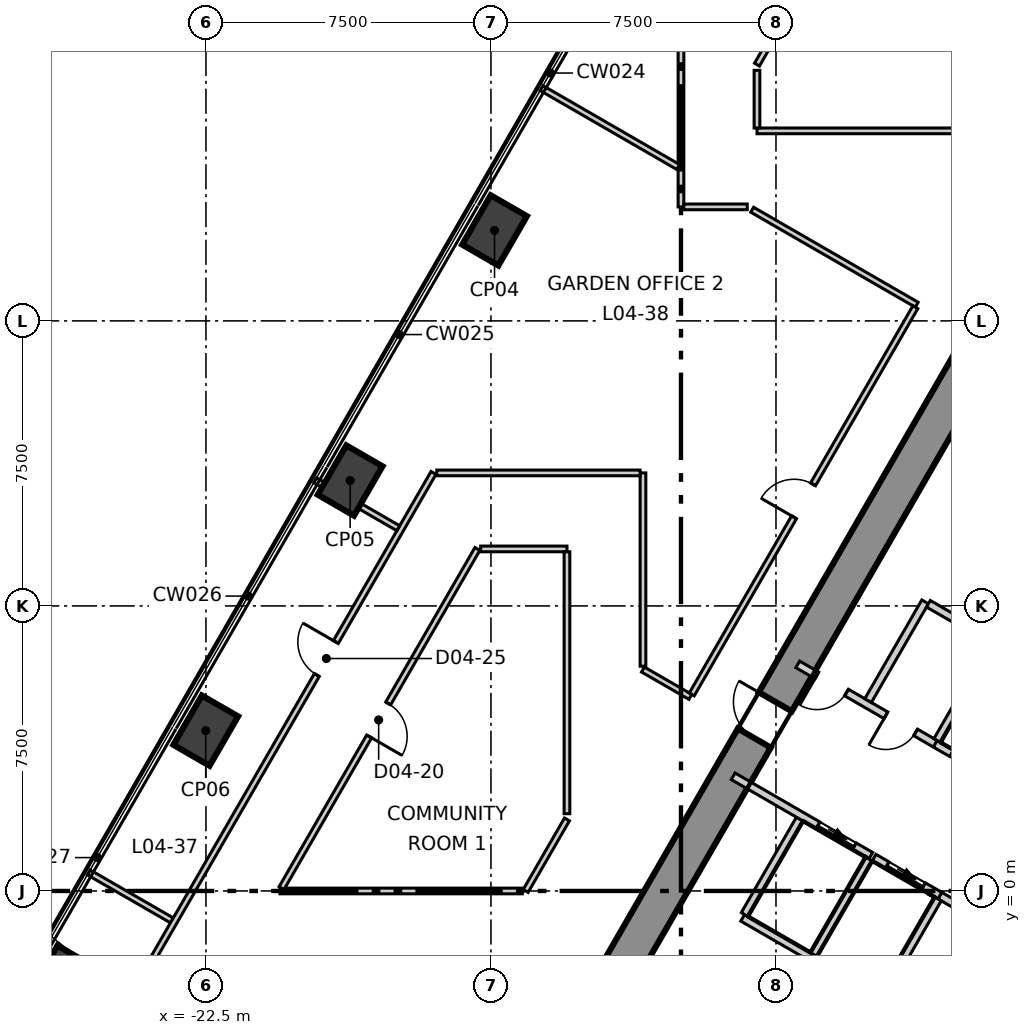
"""IFC4 building model, lengths in metres.
Left out: names, types, materials, properties, quantities, classifications, styles, units other than length and angle.
Written with IfcOpenShell. Run it as: python <this file> out.ifc"""

import sys

from ifc_helpers import new_model, si_unit, direction, frame, frame_2d, origin, origin_2d, place, context, subcontext, project, spatial, polyline, rectangle, outline, extrude, element, fill, save


model = new_model("IFC4")
c1 = context("Model", 3, precision=1e-05, world=origin(), true_north=direction((0.0, 1.0)))
c2 = subcontext(c1, "Body", "Model", "MODEL_VIEW")
j1 = project(units=[si_unit("LENGTHUNIT", "METRE"), si_unit("PLANEANGLEUNIT", "RADIAN")], contexts=[c1])
p1 = place(None, origin())
s1 = spatial("IfcSite", under=j1, at=p1, CompositionType="ELEMENT")
p2 = place(p1, origin())
s2 = spatial("IfcBuilding", under=s1, at=p2, CompositionType="ELEMENT")
p3 = place(p2, frame((0.0, 0.0, 25.3)))
s3 = spatial("IfcBuildingStorey", under=s2, at=p3, CompositionType="ELEMENT", Elevation=25.3)
p4 = place(p3, frame((-1.617, 15.2, -0.4), z_axis=(0.0, 0.0, 1.0), x_axis=(-0.499992141631, -0.866029940768, 0.0)))
e1 = element("IfcWall", 1, at=p4, inside=s3, PredefinedType="SHEAR", context=c2, shape_type="SweptSolid", body=[
    extrude(outline(polyline([(-0.289, -0.499), (1.656, -0.499), (3.601, -0.499), (5.547, -0.499), (7.492, -0.499), (9.437, -0.5), (11.382, -0.5), (13.328, -0.5), (15.273, -0.5), (17.218, -0.5), (19.163, -0.5), (21.109, -0.5), (23.054, -0.5), (24.999, -0.5), (24.422, 0.5), (22.566, 0.5), (20.709, 0.5), (18.853, 0.5), (16.997, 0.5), (15.14, 0.5), (13.284, 0.5), (11.427, 0.5), (9.571, 0.5), (7.715, 0.5), (5.858, 0.5), (4.002, 0.5), (2.146, 0.5), (0.289, 0.5), (-0.289, -0.499)])), origin(), (0.0, 0.0, 1.0), 5.0),
])
p5 = place(p4, frame((11.805, 0.0, 0.4)))
e2 = element("IfcOpeningElement", 2, at=p5, cuts=e1, PredefinedType="OPENING", context=c2, shape_type="SweptSolid", body=[
    extrude(rectangle(XDim=1.1, YDim=2.1, at=frame_2d((0.55, 1.05))), frame((0.0, 0.51, 0.0), z_axis=(0.0, -1.0, 0.0), x_axis=(1.0, 0.0, 0.0)), (0.0, 0.0, 1.0), 1.02),
])
for number, where, z_axis, x_axis in (
    (3, (-14.906, 17.381, -0.4), (0.0, 0.0, 1.0), (0.5, 0.866, 0.0)),
    (4, (-18.706, 10.8, -0.4), (0.0, 0.0, 1.0), (0.5, 0.866, 0.0)),
    (5, (-22.506, 4.219, -0.4), (0.0, 0.0, 1.0), (0.5, 0.866, 0.0)),
    (6, (-26.306, -2.362, -0.4), (0.0, 0.0, 1.0), (0.5, 0.866, 0.0)),
):
    element("IfcColumn", number, at=place(p3, frame(where, z_axis=z_axis, x_axis=x_axis)), inside=s3, PredefinedType="COLUMN", context=c2, shape_type="SweptSolid", body=[
        extrude(rectangle(XDim=1.5, YDim=1.1, at=origin_2d()), origin(), (0.0, 0.0, 1.0), 5.0),
    ])
p6 = place(p3, frame((-25.583, 0.488, 0.0), z_axis=(0.0, 0.0, 1.0), x_axis=(0.866050293573, -0.499956887143, 0.0)))
e7 = element("IfcWall", 7, at=p6, inside=s3, PredefinedType="PARTITIONING", context=c2, shape_type="SweptSolid", body=[
    extrude(rectangle(XDim=2.524, YDim=0.15, at=frame_2d((1.262, 0.0))), origin(), (0.0, 0.0, 1.0), 4.6),
])
p7 = place(p3, frame((-24.249, -2.4, 0.0), z_axis=(0.0, 0.0, 1.0), x_axis=(0.500030212684, 0.86600795978, 0.0)))
e8 = element("IfcWall", 8, at=p7, inside=s3, PredefinedType="PARTITIONING", context=c2, shape_type="SweptSolid", body=[
    extrude(rectangle(XDim=15.473, YDim=0.15, at=frame_2d((7.737, 0.0))), origin(), (0.0, 0.0, 1.0), 4.6),
])
p8 = place(p7, frame((9.334, 0.0, 0.0)))
e9 = element("IfcOpeningElement", 9, at=p8, cuts=e8, PredefinedType="OPENING", context=c2, shape_type="SweptSolid", body=[
    extrude(rectangle(XDim=1.0, YDim=2.1, at=frame_2d((0.5, 1.05))), frame((0.0, 0.085, 0.0), z_axis=(0.0, -1.0, 0.0), x_axis=(1.0, 0.0, 0.0)), (0.0, 0.0, 1.0), 0.17),
])
p9 = place(p3, frame((-19.626, 10.807, 0.0), z_axis=(0.0, 0.0, 1.0), x_axis=(0.865979509711, -0.500079482444, 0.0)))
e10 = element("IfcWall", 10, at=p9, inside=s3, PredefinedType="PARTITIONING", context=c2, shape_type="SweptSolid", body=[
    extrude(rectangle(XDim=2.525, YDim=0.15, at=frame_2d((1.263, 0.0))), origin(), (0.0, 0.0, 1.0), 4.1),
])
p10 = place(p3, frame((-11.0, 5.826, 0.0), z_axis=(0.0, 0.0, 1.0), x_axis=(0.866326729571, -0.49947772486, 0.0)))
e11 = element("IfcWall", 11, at=p10, inside=s3, PredefinedType="PARTITIONING", context=c2, shape_type="SweptSolid", body=[
    extrude(rectangle(XDim=1.439, YDim=0.15, at=frame_2d((0.72, 0.0))), origin(), (0.0, 0.0, 1.0), 4.1),
])
p11 = place(p3, frame((-10.0, 18.0, 0.0), z_axis=(0.0, 0.0, 1.0), x_axis=(0.0, 1.0, 0.0)))
e12 = element("IfcWall", 12, at=p11, inside=s3, PredefinedType="PARTITIONING", context=c2, shape_type="SweptSolid", body=[
    extrude(rectangle(XDim=4.129, YDim=0.15, at=frame_2d((2.064, 0.0))), origin(), (0.0, 0.0, 1.0), 4.6),
])
p12 = place(p3, frame((-9.925, 18.0, 0.0), z_axis=(0.0, 0.0, 1.0), x_axis=(1.0, 0.0, 0.0)))
e13 = element("IfcWall", 13, at=p12, inside=s3, PredefinedType="PARTITIONING", context=c2, shape_type="SweptSolid", body=[
    extrude(rectangle(XDim=1.669, YDim=0.15, at=frame_2d((0.834, 0.0))), origin(), (0.0, 0.0, 1.0), 4.6),
])
p13 = place(p3, frame((-13.668, 21.125, 0.0), z_axis=(0.0, 0.0, 1.0), x_axis=(0.865970972971, -0.500094265086, 0.0)))
e14 = element("IfcWall", 14, at=p13, inside=s3, PredefinedType="PARTITIONING", context=c2, shape_type="SweptSolid", body=[
    extrude(rectangle(XDim=4.149, YDim=0.15, at=frame_2d((2.075, 0.0))), origin(), (0.0, 0.0, 1.0), 4.6),
])
p14 = place(p3, frame((-8.126, 17.925, 0.0), z_axis=(0.0, 0.0, 1.0), x_axis=(0.866022959057, -0.500004234368, 0.0)))
e15 = element("IfcWall", 15, at=p14, inside=s3, PredefinedType="PARTITIONING", context=c2, shape_type="SweptSolid", body=[
    extrude(rectangle(XDim=5.0, YDim=0.15, at=frame_2d((2.5, 0.0))), origin(), (0.0, 0.0, 1.0), 4.6),
])
p15 = place(p3, frame((-9.716, 5.172, 0.0), z_axis=(0.0, 0.0, 1.0), x_axis=(0.500064951837, 0.865987900576, 0.0)))
e16 = element("IfcWall", 16, at=p15, inside=s3, PredefinedType="PARTITIONING", context=c2, shape_type="SweptSolid", body=[
    extrude(rectangle(XDim=11.765, YDim=0.15, at=frame_2d((5.882, 0.0))), origin(), (0.0, 0.0, 1.0), 4.6),
])
p16 = place(p15, frame((5.382, 0.0, 0.0)))
e17 = element("IfcOpeningElement", 17, at=p16, cuts=e16, PredefinedType="OPENING", context=c2, shape_type="SweptSolid", body=[
    extrude(rectangle(XDim=1.0, YDim=2.1, at=frame_2d((0.5, 1.05))), frame((0.0, 0.085, 0.0), z_axis=(0.0, -1.0, 0.0), x_axis=(1.0, 0.0, 0.0)), (0.0, 0.0, 1.0), 0.17),
])
p17 = place(p3, frame((-11.0, 5.913, 0.0), z_axis=(0.0, 0.0, 1.0), x_axis=(0.0, 1.0, 0.0)))
e18 = element("IfcWall", 18, at=p17, inside=s3, PredefinedType="PARTITIONING", context=c2, shape_type="SweptSolid", body=[
    extrude(rectangle(XDim=5.087, YDim=0.15, at=frame_2d((2.543, 0.0))), origin(), (0.0, 0.0, 1.0), 4.6),
])
p18 = place(p3, frame((-16.426, 11.0, 0.0), z_axis=(0.0, 0.0, 1.0), x_axis=(1.0, 0.0, 0.0)))
e19 = element("IfcWall", 19, at=p18, inside=s3, PredefinedType="PARTITIONING", context=c2, shape_type="SweptSolid", body=[
    extrude(rectangle(XDim=5.351, YDim=0.15, at=frame_2d((2.676, 0.0))), origin(), (0.0, 0.0, 1.0), 4.6),
])
p19 = place(p3, frame((-14.087, 0.0, 0.0), z_axis=(0.0, 0.0, 1.0), x_axis=(0.499907138174, 0.866079010947, 0.0)))
e20 = element("IfcWall", 20, at=p19, inside=s3, PredefinedType="PARTITIONING", context=c2, shape_type="SweptSolid", body=[
    extrude(rectangle(XDim=2.174, YDim=0.15, at=frame_2d((1.087, 0.0))), origin(), (0.0, 0.0, 1.0), 4.6),
])
p20 = place(p3, frame((-20.554, 0.0, 0.0), z_axis=(0.0, 0.0, 1.0), x_axis=(1.0, 0.0, 0.0)))
e21 = element("IfcWall", 21, at=p20, inside=s3, PredefinedType="PARTITIONING", context=c2, shape_type="SweptSolid", body=[
    extrude(rectangle(XDim=6.38, YDim=0.15, at=frame_2d((3.19, 0.0))), origin(), (0.0, 0.0, 1.0), 4.6),
])
p21 = place(p3, frame((-20.51, 0.075, 0.0), z_axis=(0.0, 0.0, 1.0), x_axis=(0.500014323953, 0.866017133688, 0.0)))
e22 = element("IfcWall", 22, at=p21, inside=s3, PredefinedType="PARTITIONING", context=c2, shape_type="SweptSolid", body=[
    extrude(rectangle(XDim=10.306, YDim=0.15, at=frame_2d((5.153, 0.0))), origin(), (0.0, 0.0, 1.0), 4.6),
])
p22 = place(p21, frame((4.609, 0.0, 0.0)))
e23 = element("IfcOpeningElement", 23, at=p22, cuts=e22, PredefinedType="OPENING", context=c2, shape_type="SweptSolid", body=[
    extrude(rectangle(XDim=1.0, YDim=2.1, at=frame_2d((0.5, 1.05))), frame((0.0, 0.085, 0.0), z_axis=(0.0, -1.0, 0.0), x_axis=(1.0, 0.0, 0.0)), (0.0, 0.0, 1.0), 0.17),
])
p23 = place(p3, frame((-8.0, 21.743, 0.0), z_axis=(0.0, 0.0, 1.0), x_axis=(0.499999188372, 0.866025872377, 0.0)))
e24 = element("IfcWall", 24, at=p23, inside=s3, PredefinedType="PARTITIONING", context=c2, shape_type="SweptSolid", body=[
    extrude(rectangle(XDim=8.986, YDim=0.15, at=frame_2d((4.493, 0.0))), origin(), (0.0, 0.0, 1.0), 4.6),
])
p24 = place(p3, frame((-15.271, 9.0, 0.0), z_axis=(0.0, 0.0, 1.0), x_axis=(1.0, 0.0, 0.0)))
e25 = element("IfcWall", 25, at=p24, inside=s3, PredefinedType="PARTITIONING", context=c2, shape_type="SweptSolid", body=[
    extrude(rectangle(XDim=2.271, YDim=0.15, at=frame_2d((1.135, 0.0))), origin(), (0.0, 0.0, 1.0), 4.6),
])
p25 = place(p3, frame((-13.0, 2.033, 0.0), z_axis=(0.0, 0.0, 1.0), x_axis=(0.0, 1.0, 0.0)))
e26 = element("IfcWall", 26, at=p25, inside=s3, PredefinedType="PARTITIONING", context=c2, shape_type="SweptSolid", body=[
    extrude(rectangle(XDim=6.892, YDim=0.15, at=frame_2d((3.446, 0.0))), origin(), (0.0, 0.0, 1.0), 4.6),
])
p26 = place(p3, frame((-8.0, 20.0, 0.0), z_axis=(0.0, 0.0, 1.0), x_axis=(1.0, 0.0, 0.0)))
e27 = element("IfcWall", 27, at=p26, inside=s3, PredefinedType="PARTITIONING", context=c2, shape_type="SweptSolid", body=[
    extrude(rectangle(XDim=15.925, YDim=0.15, at=frame_2d((7.962, 0.0))), origin(), (0.0, 0.0, 1.0), 4.6),
])
p27 = place(p26, frame((6.8, 0.0, 0.0)))
e28 = element("IfcOpeningElement", 28, at=p27, cuts=e27, PredefinedType="OPENING", context=c2, shape_type="SweptSolid", body=[
    extrude(rectangle(XDim=2.4, YDim=2.1, at=frame_2d((1.2, 1.05))), frame((0.0, 0.085, 0.0), z_axis=(0.0, -1.0, 0.0), x_axis=(1.0, 0.0, 0.0)), (0.0, 0.0, 1.0), 0.17),
])
p28 = place(p3, frame((-8.0, 20.075, 0.0), z_axis=(0.0, 0.0, 1.0), x_axis=(0.0, 1.0, 0.0)))
e29 = element("IfcWall", 29, at=p28, inside=s3, PredefinedType="PARTITIONING", context=c2, shape_type="SweptSolid", body=[
    extrude(rectangle(XDim=1.518, YDim=0.15, at=frame_2d((0.759, 0.0))), origin(), (0.0, 0.0, 1.0), 4.6),
])
p29 = place(p3, frame((-8.376, -0.707, 0.0), z_axis=(0.0, 0.0, 1.0), x_axis=(0.866067520717, -0.499927044236, 0.0)))
e30 = element("IfcWall", 30, at=p29, inside=s3, PredefinedType="SOLIDWALL", context=c2, shape_type="SweptSolid", body=[
    extrude(rectangle(XDim=2.1, YDim=0.2, at=frame_2d((1.05, 0.0))), origin(), (0.0, 0.0, 1.0), 4.6),
])
p30 = place(p3, frame((-8.326, -0.62, 0.0), z_axis=(0.0, 0.0, 1.0), x_axis=(0.500023687443, 0.866011727401, 0.0)))
e31 = element("IfcWall", 31, at=p30, inside=s3, PredefinedType="SOLIDWALL", context=c2, shape_type="SweptSolid", body=[
    extrude(rectangle(XDim=2.9, YDim=0.2, at=frame_2d((1.45, 0.0))), origin(), (0.0, 0.0, 1.0), 4.6),
])
p31 = place(p3, frame((-8.627, 3.018, 0.0), z_axis=(0.0, 0.0, 1.0), x_axis=(0.866039775641, -0.499975106388, 0.0)))
e32 = element("IfcWall", 32, at=p31, inside=s3, PredefinedType="SOLIDWALL", context=c2, shape_type="SweptSolid", body=[
    extrude(rectangle(XDim=4.182, YDim=0.2, at=frame_2d((2.091, 0.0))), origin(), (0.0, 0.0, 1.0), 4.6),
])
p32 = place(p31, frame((2.58, 0.0, 0.0)))
e33 = element("IfcOpeningElement", 33, at=p32, cuts=e32, PredefinedType="OPENING", context=c2, shape_type="SweptSolid", body=[
    extrude(rectangle(XDim=1.1, YDim=2.1, at=frame_2d((0.55, 1.05))), frame((0.0, 0.11, 0.0), z_axis=(0.0, -1.0, 0.0), x_axis=(1.0, 0.0, 0.0)), (0.0, 0.0, 1.0), 0.22),
])
p33 = place(p3, frame((-3.188, -0.122, 0.0), z_axis=(0.0, 0.0, 1.0), x_axis=(0.865705793592, -0.50055317294, 0.0)))
e34 = element("IfcWall", 34, at=p33, inside=s3, PredefinedType="SOLIDWALL", context=c2, shape_type="SweptSolid", body=[
    extrude(rectangle(XDim=0.797, YDim=0.2, at=frame_2d((0.398, 0.0))), origin(), (0.0, 0.0, 1.0), 4.6),
])
p34 = place(p3, frame((-6.927, 5.962, 0.0), z_axis=(0.0, 0.0, 1.0), x_axis=(0.866065051207, -0.49993132236, 0.0)))
e35 = element("IfcWall", 35, at=p34, inside=s3, PredefinedType="SOLIDWALL", context=c2, shape_type="SweptSolid", body=[
    extrude(rectangle(XDim=4.182, YDim=0.2, at=frame_2d((2.091, 0.0))), origin(), (0.0, 0.0, 1.0), 4.6),
])
p35 = place(p34, frame((2.68, 0.0, 0.0)))
e36 = element("IfcOpeningElement", 36, at=p35, cuts=e35, PredefinedType="OPENING", context=c2, shape_type="SweptSolid", body=[
    extrude(rectangle(XDim=0.9, YDim=2.1, at=frame_2d((0.45, 1.05))), frame((0.0, 0.11, 0.0), z_axis=(0.0, -1.0, 0.0), x_axis=(1.0, 0.0, 0.0)), (0.0, 0.0, 1.0), 0.22),
])
p36 = place(p34, frame((0.58, 0.0, 0.0)))
e37 = element("IfcOpeningElement", 37, at=p36, cuts=e35, PredefinedType="OPENING", context=c2, shape_type="SweptSolid", body=[
    extrude(rectangle(XDim=0.9, YDim=2.1, at=frame_2d((0.45, 1.05))), frame((0.0, 0.11, 0.0), z_axis=(0.0, -1.0, 0.0), x_axis=(1.0, 0.0, 0.0)), (0.0, 0.0, 1.0), 0.22),
])
p37 = place(p3, frame((-5.076, 5.009, 0.0), z_axis=(0.0, 0.0, 1.0), x_axis=(0.50002537861, 0.866010750942, 0.0)))
e38 = element("IfcWall", 38, at=p37, inside=s3, PredefinedType="SOLIDWALL", context=c2, shape_type="SweptSolid", body=[
    extrude(rectangle(XDim=3.0, YDim=0.2, at=frame_2d((1.5, 0.0))), origin(), (0.0, 0.0, 1.0), 4.6),
])
p38 = place(p3, frame((-3.489, 7.557, 0.0), z_axis=(0.0, 0.0, 1.0), x_axis=(0.866010750942, -0.50002537861, 0.0)))
e39 = element("IfcWall", 39, at=p38, inside=s3, PredefinedType="SOLIDWALL", context=c2, shape_type="SweptSolid", body=[
    extrude(rectangle(XDim=2.0, YDim=0.2, at=frame_2d((1.0, 0.0))), origin(), (0.0, 0.0, 1.0), 4.6),
])
p39 = place(p3, frame((-6.557, -1.757, 0.0), z_axis=(0.0, 0.0, 1.0), x_axis=(0.8659754619, -0.500086491905, 0.0)))
e40 = element("IfcWall", 40, at=p39, inside=s3, PredefinedType="SOLIDWALL", context=c2, shape_type="SweptSolid", body=[
    extrude(rectangle(XDim=1.916, YDim=0.2, at=frame_2d((0.958, 0.0))), origin(), (0.0, 0.0, 1.0), 4.6),
])
p40 = place(p3, frame((-6.507, -1.67, 0.0), z_axis=(0.0, 0.0, 1.0), x_axis=(0.50012328804, 0.865954211699, 0.0)))
e41 = element("IfcWall", 41, at=p40, inside=s3, PredefinedType="SOLIDWALL", context=c2, shape_type="SweptSolid", body=[
    extrude(rectangle(XDim=2.9, YDim=0.2, at=frame_2d((1.45, 0.0))), origin(), (0.0, 0.0, 1.0), 4.6),
])
p41 = place(p3, frame((-4.92, 0.878, 0.0), z_axis=(0.0, 0.0, 1.0), x_axis=(0.866010750942, -0.50002537861, 0.0)))
e42 = element("IfcWall", 42, at=p41, inside=s3, PredefinedType="SOLIDWALL", context=c2, shape_type="SweptSolid", body=[
    extrude(rectangle(XDim=2.0, YDim=0.2, at=frame_2d((1.0, 0.0))), origin(), (0.0, 0.0, 1.0), 4.6),
])
p42 = place(p41, frame((0.4, 0.0, 0.0)))
e43 = element("IfcOpeningElement", 43, at=p42, cuts=e42, PredefinedType="OPENING", context=c2, shape_type="SweptSolid", body=[
    extrude(rectangle(XDim=1.1, YDim=2.1, at=frame_2d((0.55, 1.05))), frame((0.0, 0.11, 0.0), z_axis=(0.0, -1.0, 0.0), x_axis=(1.0, 0.0, 0.0)), (0.0, 0.0, 1.0), 0.22),
])
p43 = place(p3, frame((-4.619, -2.6, 0.0), z_axis=(0.0, 0.0, 1.0), x_axis=(0.50009492287, 0.865970593103, 0.0)))
e44 = element("IfcWall", 44, at=p43, inside=s3, PredefinedType="SOLIDWALL", context=c2, shape_type="SweptSolid", body=[
    extrude(rectangle(XDim=2.761, YDim=0.2, at=frame_2d((1.381, 0.0))), origin(), (0.0, 0.0, 1.0), 4.6),
])
p44 = place(p3, frame((-3.309, 3.873, 0.0), z_axis=(0.0, 0.0, 1.0), x_axis=(0.866098583652, -0.499873227325, 0.0)))
e45 = element("IfcWall", 45, at=p44, inside=s3, PredefinedType="SOLIDWALL", context=c2, shape_type="SweptSolid", body=[
    extrude(rectangle(XDim=2.103, YDim=0.2, at=frame_2d((1.051, 0.0))), origin(), (0.0, 0.0, 1.0), 4.6),
])
p45 = place(p44, frame((0.502, 0.0, 0.0)))
e46 = element("IfcOpeningElement", 46, at=p45, cuts=e45, PredefinedType="OPENING", context=c2, shape_type="SweptSolid", body=[
    extrude(rectangle(XDim=1.1, YDim=2.1, at=frame_2d((0.55, 1.05))), frame((0.0, 0.11, 0.0), z_axis=(0.0, -1.0, 0.0), x_axis=(1.0, 0.0, 0.0)), (0.0, 0.0, 1.0), 0.22),
])
p46 = place(p3, frame((-3.257, 3.959, 0.0), z_axis=(0.0, 0.0, 1.0), x_axis=(0.50012328804, 0.865954211699, 0.0)))
e47 = element("IfcWall", 47, at=p46, inside=s3, PredefinedType="SOLIDWALL", context=c2, shape_type="SweptSolid", body=[
    extrude(rectangle(XDim=2.9, YDim=0.2, at=frame_2d((1.45, 0.0))), origin(), (0.0, 0.0, 1.0), 4.6),
])
p47 = place(p42, origin())
e48 = element("IfcDoor", 48, at=p47, inside=s3, OperationType="SLIDING_TO_LEFT", PredefinedType="DOOR", context=c2, shape_type="SweptSolid", body=[
    extrude(rectangle(XDim=1.1, YDim=2.1, at=frame_2d((0.55, 1.05))), frame((0.0, 0.025, 0.0), z_axis=(0.0, -1.0, 0.0), x_axis=(1.0, 0.0, 0.0)), (0.0, 0.0, 1.0), 0.05),
])
fill(e43, e48)
p48 = place(p32, origin())
e49 = element("IfcDoor", 49, at=p48, inside=s3, OperationType="SLIDING_TO_LEFT", PredefinedType="DOOR", context=c2, shape_type="SweptSolid", body=[
    extrude(rectangle(XDim=1.1, YDim=2.1, at=frame_2d((0.55, 1.05))), frame((0.0, 0.025, 0.0), z_axis=(0.0, -1.0, 0.0), x_axis=(1.0, 0.0, 0.0)), (0.0, 0.0, 1.0), 0.05),
])
fill(e33, e49)
p49 = place(p35, origin())
e50 = element("IfcDoor", 50, at=p49, inside=s3, OperationType="SINGLE_SWING_LEFT", PredefinedType="DOOR", context=c2, shape_type="SweptSolid", body=[
    extrude(rectangle(XDim=0.9, YDim=2.1, at=frame_2d((0.45, 1.05))), frame((0.0, 0.025, 0.0), z_axis=(0.0, -1.0, 0.0), x_axis=(1.0, 0.0, 0.0)), (0.0, 0.0, 1.0), 0.05),
])
fill(e36, e50)
p50 = place(p22, origin())
e51 = element("IfcDoor", 51, at=p50, inside=s3, OperationType="SINGLE_SWING_LEFT", PredefinedType="DOOR", context=c2, shape_type="SweptSolid", body=[
    extrude(rectangle(XDim=1.0, YDim=2.1, at=frame_2d((0.5, 1.05))), frame((0.0, 0.025, 0.0), z_axis=(0.0, -1.0, 0.0), x_axis=(1.0, 0.0, 0.0)), (0.0, 0.0, 1.0), 0.05),
])
fill(e23, e51)
p51 = place(p8, origin())
e52 = element("IfcDoor", 52, at=p51, inside=s3, OperationType="SINGLE_SWING_LEFT", PredefinedType="DOOR", context=c2, shape_type="SweptSolid", body=[
    extrude(rectangle(XDim=1.0, YDim=2.1, at=frame_2d((0.5, 1.05))), frame((0.0, 0.025, 0.0), z_axis=(0.0, -1.0, 0.0), x_axis=(1.0, 0.0, 0.0)), (0.0, 0.0, 1.0), 0.05),
])
fill(e9, e52)
p52 = place(p16, origin())
e53 = element("IfcDoor", 53, at=p52, inside=s3, OperationType="SINGLE_SWING_RIGHT", PredefinedType="DOOR", context=c2, shape_type="SweptSolid", body=[
    extrude(rectangle(XDim=1.0, YDim=2.1, at=frame_2d((0.5, 1.05))), frame((0.0, 0.025, 0.0), z_axis=(0.0, -1.0, 0.0), x_axis=(1.0, 0.0, 0.0)), (0.0, 0.0, 1.0), 0.05),
])
fill(e17, e53)
p53 = place(p5, origin())
e54 = element("IfcDoor", 54, at=p53, inside=s3, OperationType="SINGLE_SWING_LEFT", PredefinedType="DOOR", context=c2, shape_type="SweptSolid", body=[
    extrude(rectangle(XDim=1.1, YDim=2.1, at=frame_2d((0.55, 1.05))), frame((0.0, 0.025, 0.0), z_axis=(0.0, -1.0, 0.0), x_axis=(1.0, 0.0, 0.0)), (0.0, 0.0, 1.0), 0.05),
])
fill(e2, e54)
p54 = place(p36, origin())
e55 = element("IfcDoor", 55, at=p54, inside=s3, OperationType="SINGLE_SWING_LEFT", PredefinedType="DOOR", context=c2, shape_type="SweptSolid", body=[
    extrude(rectangle(XDim=0.9, YDim=2.1, at=frame_2d((0.45, 1.05))), frame((0.0, 0.025, 0.0), z_axis=(0.0, -1.0, 0.0), x_axis=(1.0, 0.0, 0.0)), (0.0, 0.0, 1.0), 0.05),
])
fill(e37, e55)
save(model, sys.argv[1])
